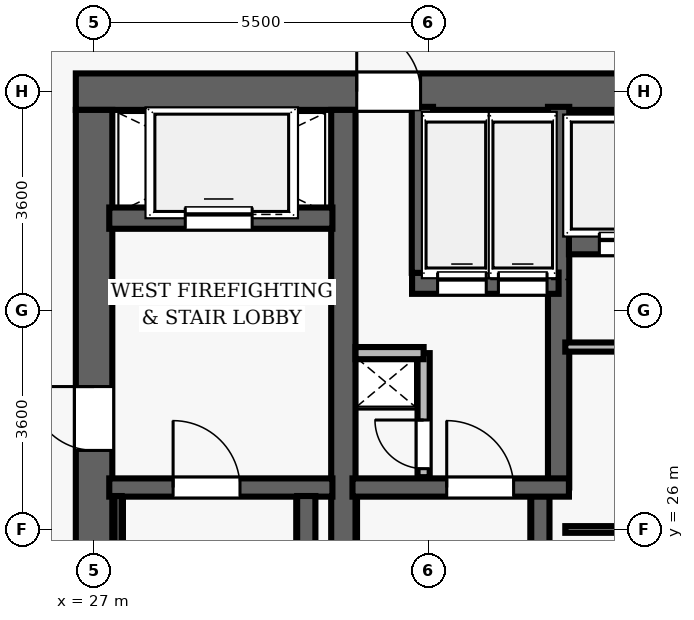
"""IFC4 building model, lengths in metres.
Left out: names, types, materials, properties, quantities, classifications, styles, units other than length and angle.
Written with IfcOpenShell. Run it as: python <this file> out.ifc"""

import sys

from ifc_helpers import new_model, si_unit, direction, frame, frame_2d, origin, place, context, subcontext, project, spatial, rectangle, extrude, element, fill, save


model = new_model("IFC4")
c1 = context("Model", 3, precision=1e-05, world=origin(), true_north=direction((0.0, 1.0)))
c2 = subcontext(c1, "Body", "Model", "MODEL_VIEW")
j1 = project(units=[si_unit("LENGTHUNIT", "METRE"), si_unit("PLANEANGLEUNIT", "RADIAN")], contexts=[c1])
p1 = place(None, origin())
s1 = spatial("IfcSite", under=j1, at=p1, CompositionType="ELEMENT")
p2 = place(p1, origin())
s2 = spatial("IfcBuilding", under=s1, at=p2, CompositionType="ELEMENT")
p3 = place(p2, frame((0.0, 0.0, 58.9)))
s3 = spatial("IfcBuildingStorey", under=s2, at=p3, CompositionType="ELEMENT", Elevation=58.9)
p4 = place(p3, frame((26.7, 33.2, 0.0), z_axis=(0.0, 0.0, 1.0), x_axis=(1.0, 0.0, 0.0)))
e1 = element("IfcWall", 1, at=p4, inside=s3, PredefinedType="SHEAR", context=c2, shape_type="SweptSolid", body=[
    extrude(rectangle(XDim=22.6, YDim=0.6, at=frame_2d((11.3, 0.0))), origin(), (0.0, 0.0, 1.0), 3.5),
])
p5 = place(p4, frame((4.62, 0.0, 0.0)))
e2 = element("IfcOpeningElement", 2, at=p5, cuts=e1, PredefinedType="OPENING", context=c2, shape_type="SweptSolid", body=[
    extrude(rectangle(XDim=1.05, YDim=2.15, at=frame_2d((0.525, 1.075))), frame((0.0, 0.31, 0.0), z_axis=(0.0, -1.0, 0.0), x_axis=(1.0, 0.0, 0.0)), (0.0, 0.0, 1.0), 0.62),
])
p6 = place(p4, frame((14.52, 0.0, 0.0)))
e3 = element("IfcOpeningElement", 3, at=p6, cuts=e1, PredefinedType="OPENING", context=c2, shape_type="SweptSolid", body=[
    extrude(rectangle(XDim=1.05, YDim=2.15, at=frame_2d((0.525, 1.075))), frame((0.0, 0.31, 0.0), z_axis=(0.0, -1.0, 0.0), x_axis=(1.0, 0.0, 0.0)), (0.0, 0.0, 1.0), 0.62),
])
p7 = place(p3, frame((27.0, 19.1, 0.0), z_axis=(0.0, 0.0, 1.0), x_axis=(0.0, 1.0, 0.0)))
e4 = element("IfcWall", 4, at=p7, inside=s3, PredefinedType="SHEAR", context=c2, shape_type="SweptSolid", body=[
    extrude(rectangle(XDim=13.8, YDim=0.6, at=frame_2d((6.9, 0.0))), origin(), (0.0, 0.0, 1.0), 3.5),
])
p8 = place(p7, frame((8.2, 0.0, 0.0)))
e5 = element("IfcOpeningElement", 5, at=p8, cuts=e4, PredefinedType="OPENING", context=c2, shape_type="SweptSolid", body=[
    extrude(rectangle(XDim=1.05, YDim=2.15, at=frame_2d((0.525, 1.075))), frame((0.0, 0.31, 0.0), z_axis=(0.0, -1.0, 0.0), x_axis=(1.0, 0.0, 0.0)), (0.0, 0.0, 1.0), 0.62),
])
p9 = place(p3, frame((31.1, 19.1, 0.0), z_axis=(0.0, 0.0, 1.0), x_axis=(0.0, 1.0, 0.0)))
e6 = element("IfcWall", 6, at=p9, inside=s3, PredefinedType="SHEAR", context=c2, shape_type="SweptSolid", body=[
    extrude(rectangle(XDim=13.8, YDim=0.4, at=frame_2d((6.9, 0.0))), origin(), (0.0, 0.0, 1.0), 3.5),
])
p10 = place(p3, frame((27.25, 26.69, 0.0), z_axis=(0.0, 0.0, 1.0), x_axis=(1.0, 0.0, 0.0)))
e7 = element("IfcWall", 7, at=p10, inside=s3, PredefinedType="SHEAR", context=c2, shape_type="SweptSolid", body=[
    extrude(rectangle(XDim=3.67, YDim=0.3, at=frame_2d((1.835, 0.0))), origin(), (0.0, 0.0, 1.0), 3.5),
])
p11 = place(p10, frame((1.05, 0.0, 0.0)))
e8 = element("IfcOpeningElement", 8, at=p11, cuts=e7, PredefinedType="OPENING", context=c2, shape_type="SweptSolid", body=[
    extrude(rectangle(XDim=1.1, YDim=2.15, at=frame_2d((0.55, 1.075))), frame((0.0, 0.16, 0.0), z_axis=(0.0, -1.0, 0.0), x_axis=(1.0, 0.0, 0.0)), (0.0, 0.0, 1.0), 0.32),
])
p12 = place(p3, frame((30.49, 19.05, 0.0), z_axis=(0.0, 0.0, 1.0), x_axis=(0.0, 1.0, 0.0)))
e9 = element("IfcWall", 9, at=p12, inside=s3, PredefinedType="SHEAR", context=c2, shape_type="SweptSolid", body=[
    extrude(rectangle(XDim=7.5, YDim=0.3, at=frame_2d((3.75, 0.0))), origin(), (0.0, 0.0, 1.0), 3.5),
])
p13 = place(p3, frame((27.395, 19.1, 0.0), z_axis=(0.0, 0.0, 1.0), x_axis=(0.0, 1.0, 0.0)))
e10 = element("IfcWall", 10, at=p13, inside=s3, PredefinedType="SHEAR", context=c2, shape_type="SweptSolid", body=[
    extrude(rectangle(XDim=7.45, YDim=0.12, at=frame_2d((3.725, 0.0))), origin(), (0.0, 0.0, 1.0), 3.5),
])
p14 = place(p3, frame((27.25, 31.12, 0.0), z_axis=(0.0, 0.0, 1.0), x_axis=(1.0, 0.0, 0.0)))
e11 = element("IfcWall", 11, at=p14, inside=s3, PredefinedType="SHEAR", context=c2, shape_type="SweptSolid", body=[
    extrude(rectangle(XDim=3.67, YDim=0.35, at=frame_2d((1.835, 0.0))), origin(), (0.0, 0.0, 1.0), 2.6),
])
p15 = place(p14, frame((1.25, 0.0, 0.0)))
e12 = element("IfcOpeningElement", 12, at=p15, cuts=e11, PredefinedType="OPENING", context=c2, shape_type="SweptSolid", body=[
    extrude(rectangle(XDim=1.1, YDim=2.15, at=frame_2d((0.55, 1.075))), frame((0.0, 0.185, 0.0), z_axis=(0.0, -1.0, 0.0), x_axis=(1.0, 0.0, 0.0)), (0.0, 0.0, 1.0), 0.37),
])
p16 = place(p3, frame((34.34, 19.05, 0.0), z_axis=(0.0, 0.0, 1.0), x_axis=(0.0, 1.0, 0.0)))
e13 = element("IfcWall", 13, at=p16, inside=s3, PredefinedType="SHEAR", context=c2, shape_type="SweptSolid", body=[
    extrude(rectangle(XDim=7.5, YDim=0.3, at=frame_2d((3.75, 0.0))), origin(), (0.0, 0.0, 1.0), 3.5),
])
p17 = place(p3, frame((34.64, 26.69, 0.0), z_axis=(0.0, 0.0, 1.0), x_axis=(0.0, 1.0, 0.0)))
e14 = element("IfcWall", 14, at=p17, inside=s3, PredefinedType="SHEAR", context=c2, shape_type="SweptSolid", body=[
    extrude(rectangle(XDim=6.26, YDim=0.35, at=frame_2d((3.13, 0.0))), origin(), (0.0, 0.0, 1.0), 3.5),
])
p18 = place(p3, frame((31.25, 26.69, 0.0), z_axis=(0.0, 0.0, 1.0), x_axis=(1.0, 0.0, 0.0)))
e15 = element("IfcWall", 15, at=p18, inside=s3, PredefinedType="SHEAR", context=c2, shape_type="SweptSolid", body=[
    extrude(rectangle(XDim=3.56, YDim=0.3, at=frame_2d((1.78, 0.0))), origin(), (0.0, 0.0, 1.0), 3.5),
])
p19 = place(p18, frame((1.55, 0.0, 0.0)))
e16 = element("IfcOpeningElement", 16, at=p19, cuts=e15, PredefinedType="OPENING", context=c2, shape_type="SweptSolid", body=[
    extrude(rectangle(XDim=1.1, YDim=2.15, at=frame_2d((0.55, 1.075))), frame((0.0, 0.16, 0.0), z_axis=(0.0, -1.0, 0.0), x_axis=(1.0, 0.0, 0.0)), (0.0, 0.0, 1.0), 0.32),
])
p20 = place(p3, frame((32.23, 30.05, 0.0), z_axis=(0.0, 0.0, 1.0), x_axis=(1.0, 0.0, 0.0)))
e17 = element("IfcWall", 17, at=p20, inside=s3, PredefinedType="SHEAR", context=c2, shape_type="SweptSolid", body=[
    extrude(rectangle(XDim=2.41, YDim=0.35, at=frame_2d((1.205, 0.0))), origin(), (0.0, 0.0, 1.0), 2.6),
])
p21 = place(p20, frame((0.42, 0.0, 0.0)))
e18 = element("IfcOpeningElement", 18, at=p21, cuts=e17, PredefinedType="OPENING", context=c2, shape_type="SweptSolid", body=[
    extrude(rectangle(XDim=0.8, YDim=2.15, at=frame_2d((0.4, 1.075))), frame((0.0, 0.185, 0.0), z_axis=(0.0, -1.0, 0.0), x_axis=(1.0, 0.0, 0.0)), (0.0, 0.0, 1.0), 0.37),
])
p22 = place(p20, frame((1.42, 0.0, 0.0)))
e19 = element("IfcOpeningElement", 19, at=p22, cuts=e17, PredefinedType="OPENING", context=c2, shape_type="SweptSolid", body=[
    extrude(rectangle(XDim=0.8, YDim=2.15, at=frame_2d((0.4, 1.075))), frame((0.0, 0.185, 0.0), z_axis=(0.0, -1.0, 0.0), x_axis=(1.0, 0.0, 0.0)), (0.0, 0.0, 1.0), 0.37),
])
p23 = place(p3, frame((32.4, 30.22, 0.0), z_axis=(0.0, 0.0, 1.0), x_axis=(0.0, 1.0, 0.0)))
e20 = element("IfcWall", 20, at=p23, inside=s3, PredefinedType="SHEAR", context=c2, shape_type="SweptSolid", body=[
    extrude(rectangle(XDim=2.73, YDim=0.35, at=frame_2d((1.365, 0.0))), origin(), (0.0, 0.0, 1.0), 2.6),
])
p24 = place(p3, frame((32.42, 26.86, 0.0), z_axis=(0.0, 0.0, 1.0), x_axis=(0.0, 1.0, 0.0)))
e21 = element("IfcWall", 21, at=p24, inside=s3, PredefinedType="PARTITIONING", context=c2, shape_type="SweptSolid", body=[
    extrude(rectangle(XDim=2.04, YDim=0.2, at=frame_2d((1.02, 0.0))), origin(), (0.0, 0.0, 1.0), 2.6),
])
p25 = place(p24, frame((0.14, 0.0, 0.0)))
e22 = element("IfcOpeningElement", 22, at=p25, cuts=e21, PredefinedType="OPENING", context=c2, shape_type="SweptSolid", body=[
    extrude(rectangle(XDim=0.8, YDim=2.05, at=frame_2d((0.4, 1.025))), frame((0.0, 0.11, 0.0), z_axis=(0.0, -1.0, 0.0), x_axis=(1.0, 0.0, 0.0)), (0.0, 0.0, 1.0), 0.22),
])
p26 = place(p3, frame((31.3, 28.9, 0.0), z_axis=(0.0, 0.0, 1.0), x_axis=(1.0, 0.0, 0.0)))
e23 = element("IfcWall", 23, at=p26, inside=s3, PredefinedType="PARTITIONING", context=c2, shape_type="SweptSolid", body=[
    extrude(rectangle(XDim=1.12, YDim=0.2, at=frame_2d((0.56, 0.0))), origin(), (0.0, 0.0, 1.0), 2.6),
])
p27 = place(p3, frame((34.81, 30.7, 0.0), z_axis=(0.0, 0.0, 1.0), x_axis=(1.0, 0.0, 0.0)))
e24 = element("IfcWall", 24, at=p27, inside=s3, PredefinedType="SHEAR", context=c2, shape_type="SweptSolid", body=[
    extrude(rectangle(XDim=6.36, YDim=0.35, at=frame_2d((3.18, 0.0))), origin(), (0.0, 0.0, 1.0), 2.6),
])
p28 = place(p27, frame((0.5, 0.0, 0.0)))
e25 = element("IfcOpeningElement", 25, at=p28, cuts=e24, PredefinedType="OPENING", context=c2, shape_type="SweptSolid", body=[
    extrude(rectangle(XDim=0.9, YDim=2.15, at=frame_2d((0.45, 1.075))), frame((0.0, 0.185, 0.0), z_axis=(0.0, -1.0, 0.0), x_axis=(1.0, 0.0, 0.0)), (0.0, 0.0, 1.0), 0.37),
])
p29 = place(p27, frame((2.58, 0.0, 0.0)))
e26 = element("IfcOpeningElement", 26, at=p29, cuts=e24, PredefinedType="OPENING", context=c2, shape_type="SweptSolid", body=[
    extrude(rectangle(XDim=0.9, YDim=2.15, at=frame_2d((0.45, 1.075))), frame((0.0, 0.185, 0.0), z_axis=(0.0, -1.0, 0.0), x_axis=(1.0, 0.0, 0.0)), (0.0, 0.0, 1.0), 0.37),
])
p30 = place(p27, frame((4.66, 0.0, 0.0)))
e27 = element("IfcOpeningElement", 27, at=p30, cuts=e24, PredefinedType="OPENING", context=c2, shape_type="SweptSolid", body=[
    extrude(rectangle(XDim=0.9, YDim=2.15, at=frame_2d((0.45, 1.075))), frame((0.0, 0.185, 0.0), z_axis=(0.0, -1.0, 0.0), x_axis=(1.0, 0.0, 0.0)), (0.0, 0.0, 1.0), 0.37),
])
p31 = place(p3, frame((34.75, 29.0, 0.0), z_axis=(0.0, 0.0, 1.0), x_axis=(1.0, 0.0, 0.0)))
e28 = element("IfcWall", 28, at=p31, inside=s3, PredefinedType="PARTITIONING", context=c2, shape_type="SweptSolid", body=[
    extrude(rectangle(XDim=6.25, YDim=0.15, at=frame_2d((3.125, 0.0))), origin(), (0.0, 0.0, 1.0), 2.6),
])
p32 = place(p3, frame((34.75, 26.0, 0.0), z_axis=(0.0, 0.0, 1.0), x_axis=(1.0, 0.0, 0.0)))
e29 = element("IfcWall", 29, at=p32, inside=s3, PredefinedType="PARTITIONING", context=c2, shape_type="SweptSolid", body=[
    extrude(rectangle(XDim=6.25, YDim=0.11, at=frame_2d((3.125, 0.0))), origin(), (0.0, 0.0, 1.0), 2.6),
])
p33 = place(p11, origin())
e30 = element("IfcDoor", 30, at=p33, inside=s3, OperationType="SINGLE_SWING_LEFT", PredefinedType="DOOR", context=c2, shape_type="SweptSolid", body=[
    extrude(rectangle(XDim=1.1, YDim=2.15, at=frame_2d((0.55, 1.075))), frame((0.0, 0.025, 0.0), z_axis=(0.0, -1.0, 0.0), x_axis=(1.0, 0.0, 0.0)), (0.0, 0.0, 1.0), 0.05),
])
fill(e8, e30)
p34 = place(p8, origin())
e31 = element("IfcDoor", 31, at=p34, inside=s3, OperationType="SINGLE_SWING_RIGHT", PredefinedType="DOOR", context=c2, shape_type="SweptSolid", body=[
    extrude(rectangle(XDim=1.05, YDim=2.15, at=frame_2d((0.525, 1.075))), frame((0.0, 0.025, 0.0), z_axis=(0.0, -1.0, 0.0), x_axis=(1.0, 0.0, 0.0)), (0.0, 0.0, 1.0), 0.05),
])
fill(e5, e31)
p35 = place(p19, origin())
e32 = element("IfcDoor", 32, at=p35, inside=s3, OperationType="SINGLE_SWING_LEFT", PredefinedType="DOOR", context=c2, shape_type="SweptSolid", body=[
    extrude(rectangle(XDim=1.1, YDim=2.15, at=frame_2d((0.55, 1.075))), frame((0.0, 0.025, 0.0), z_axis=(0.0, -1.0, 0.0), x_axis=(1.0, 0.0, 0.0)), (0.0, 0.0, 1.0), 0.05),
])
fill(e16, e32)
p36 = place(p25, origin())
e33 = element("IfcDoor", 33, at=p36, inside=s3, OperationType="SINGLE_SWING_RIGHT", PredefinedType="DOOR", context=c2, shape_type="SweptSolid", body=[
    extrude(rectangle(XDim=0.8, YDim=2.05, at=frame_2d((0.4, 1.025))), frame((0.0, 0.025, 0.0), z_axis=(0.0, -1.0, 0.0), x_axis=(1.0, 0.0, 0.0)), (0.0, 0.0, 1.0), 0.05),
])
fill(e22, e33)
p37 = place(p5, origin())
e34 = element("IfcDoor", 34, at=p37, inside=s3, OperationType="SINGLE_SWING_LEFT", PredefinedType="DOOR", context=c2, shape_type="SweptSolid", body=[
    extrude(rectangle(XDim=1.05, YDim=2.15, at=frame_2d((0.525, 1.075))), frame((0.0, 0.025, 0.0), z_axis=(0.0, -1.0, 0.0), x_axis=(1.0, 0.0, 0.0)), (0.0, 0.0, 1.0), 0.05),
])
fill(e2, e34)
p38 = place(p28, origin())
e35 = element("IfcDoor", 35, at=p38, inside=s3, OperationType="SLIDING_TO_LEFT", PredefinedType="DOOR", context=c2, shape_type="SweptSolid", body=[
    extrude(rectangle(XDim=0.9, YDim=2.15, at=frame_2d((0.45, 1.075))), frame((0.0, 0.025, 0.0), z_axis=(0.0, -1.0, 0.0), x_axis=(1.0, 0.0, 0.0)), (0.0, 0.0, 1.0), 0.05),
])
fill(e25, e35)
p39 = place(p15, origin())
e36 = element("IfcDoor", 36, at=p39, inside=s3, OperationType="SLIDING_TO_LEFT", PredefinedType="DOOR", context=c2, shape_type="SweptSolid", body=[
    extrude(rectangle(XDim=1.1, YDim=2.15, at=frame_2d((0.55, 1.075))), frame((0.0, 0.025, 0.0), z_axis=(0.0, -1.0, 0.0), x_axis=(1.0, 0.0, 0.0)), (0.0, 0.0, 1.0), 0.05),
])
fill(e12, e36)
p40 = place(p21, origin())
e37 = element("IfcDoor", 37, at=p40, inside=s3, OperationType="SLIDING_TO_LEFT", PredefinedType="DOOR", context=c2, shape_type="SweptSolid", body=[
    extrude(rectangle(XDim=0.8, YDim=2.15, at=frame_2d((0.4, 1.075))), frame((0.0, 0.025, 0.0), z_axis=(0.0, -1.0, 0.0), x_axis=(1.0, 0.0, 0.0)), (0.0, 0.0, 1.0), 0.05),
])
fill(e18, e37)
p41 = place(p22, origin())
e38 = element("IfcDoor", 38, at=p41, inside=s3, OperationType="SLIDING_TO_LEFT", PredefinedType="DOOR", context=c2, shape_type="SweptSolid", body=[
    extrude(rectangle(XDim=0.8, YDim=2.15, at=frame_2d((0.4, 1.075))), frame((0.0, 0.025, 0.0), z_axis=(0.0, -1.0, 0.0), x_axis=(1.0, 0.0, 0.0)), (0.0, 0.0, 1.0), 0.05),
])
fill(e19, e38)
save(model, sys.argv[1])
